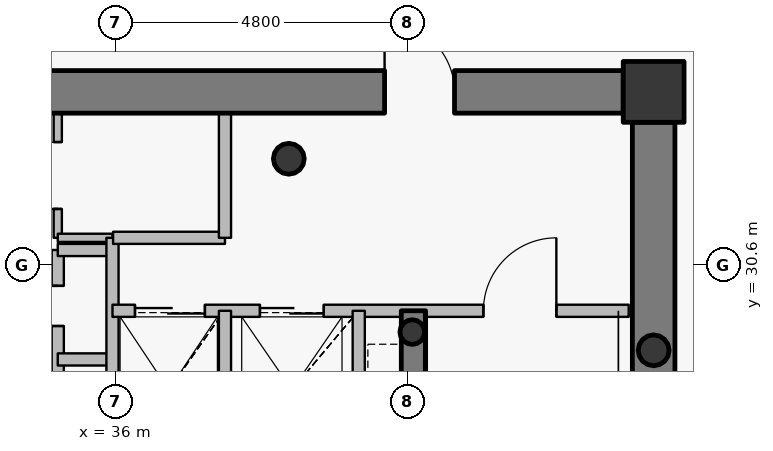
"""IFC4 building model, lengths in metres.
Left out: names, types, materials, properties, quantities, classifications, styles, units other than length and angle.
Written with IfcOpenShell. Run it as: python <this file> out.ifc"""

import sys

from ifc_helpers import new_model, si_unit, direction, frame, frame_2d, origin, origin_2d, place, context, subcontext, project, spatial, rectangle, hollow_circle, extrude, source, transform, mapped, element, fill, save


model = new_model("IFC4")
c1 = context("Model", 3, precision=1e-05, world=origin(), true_north=direction((0.0, 1.0)))
c2 = subcontext(c1, "Body", "Model", "MODEL_VIEW")
j1 = project(units=[si_unit("LENGTHUNIT", "METRE"), si_unit("PLANEANGLEUNIT", "RADIAN")], contexts=[c1])
p1 = place(None, origin())
s1 = spatial("IfcSite", under=j1, at=p1, CompositionType="ELEMENT")
p2 = place(p1, origin())
s2 = spatial("IfcBuilding", under=s1, at=p2, CompositionType="ELEMENT")
p3 = place(p2, frame((0.0, 0.0, 288.0)))
s3 = spatial("IfcBuildingStorey", under=s2, at=p3, CompositionType="ELEMENT", Elevation=288.0)
p4 = place(p3, frame((44.85, 33.45, 0.0), z_axis=(0.0, 0.0, 1.0), x_axis=(1.0, 0.0, 0.0)))
e1 = element("IfcColumn", 1, at=p4, inside=s3, PredefinedType="COLUMN", context=c2, shape_type="SweptSolid", body=[
    extrude(rectangle(XDim=1.0, YDim=1.0, at=origin_2d()), origin(), (0.0, 0.0, 1.0), 3.75),
])
p5 = place(p3, frame((38.85, 32.35, 0.0), z_axis=(0.0, 0.0, 1.0), x_axis=(1.0, 0.0, 0.0)))
e2 = element("IfcColumn", 2, at=p5, inside=s3, PredefinedType="COLUMN", context=c2, shape_type="SweptSolid", body=[
    extrude(hollow_circle(Radius=0.254, WallThickness=0.02, at=origin_2d()), origin(), (0.0, 0.0, 1.0), 3.75),
])
p6 = place(p3, frame((40.88, 29.5, 0.0), z_axis=(0.0, 0.0, 1.0), x_axis=(1.0, 0.0, 0.0)))
e3 = element("IfcColumn", 3, at=p6, inside=s3, PredefinedType="COLUMN", context=c2, shape_type="SweptSolid", body=[
    extrude(hollow_circle(Radius=0.203, WallThickness=0.016, at=origin_2d()), origin(), (0.0, 0.0, 1.0), 3.75),
])
p7 = place(p3, frame((27.65, 33.45, 0.0), z_axis=(0.0, 0.0, 1.0), x_axis=(1.0, 0.0, 0.0)))
e4 = element("IfcWall", 4, at=p7, inside=s3, PredefinedType="SHEAR", context=c2, shape_type="SweptSolid", body=[
    extrude(rectangle(XDim=16.7, YDim=0.7, at=frame_2d((8.35, 0.0))), origin(), (0.0, 0.0, 1.0), 3.05),
])
p8 = place(p7, frame((12.775, 0.0, 0.0)))
e5 = element("IfcOpeningElement", 5, at=p8, cuts=e4, PredefinedType="OPENING", context=c2, shape_type="SweptSolid", body=[
    extrude(rectangle(XDim=1.15, YDim=2.15, at=origin_2d()), frame((0.575, 0.36, 1.075), z_axis=(0.0, -1.0, 0.0), x_axis=(1.0, 0.0, 0.0)), (0.0, 0.0, 1.0), 0.72),
])
p9 = place(p3, frame((44.85, 32.95, 0.0), z_axis=(0.0, 0.0, 1.0), x_axis=(0.0, -1.0, 0.0)))
e6 = element("IfcWall", 6, at=p9, inside=s3, PredefinedType="SHEAR", context=c2, shape_type="SweptSolid", body=[
    extrude(rectangle(XDim=11.9, YDim=0.7, at=frame_2d((5.95, 0.0))), origin(), (0.0, 0.0, 1.0), 3.05),
])
p10 = place(p3, frame((40.9, 27.25, 0.0), z_axis=(0.0, 0.0, 1.0), x_axis=(0.0, 1.0, 0.0)))
e7 = element("IfcWall", 7, at=p10, inside=s3, PredefinedType="SHEAR", context=c2, shape_type="SweptSolid", body=[
    extrude(rectangle(XDim=2.6, YDim=0.4, at=frame_2d((1.3, 0.0))), origin(), (0.0, 0.0, 1.0), 3.1),
])
p11 = place(p3, frame((44.85, 29.2, 0.0), z_axis=(0.0, 0.0, 1.0), x_axis=(1.0, 0.0, 0.0)))
e8 = element("IfcColumn", 8, at=p11, inside=s3, PredefinedType="COLUMN", context=c2, shape_type="SweptSolid", body=[
    extrude(hollow_circle(Radius=0.254, WallThickness=0.02, at=origin_2d()), origin(), (0.0, 0.0, 1.0), 3.75),
])
p12 = place(p3, frame((35.05, 27.25, 0.0), z_axis=(0.0, 0.0, 1.0), x_axis=(0.0, 1.0, 0.0)))
e9 = element("IfcWall", 9, at=p12, inside=s3, PredefinedType="PARTITIONING", context=c2, shape_type="SweptSolid", body=[
    extrude(rectangle(XDim=3.6, YDim=0.2, at=frame_2d((1.8, 0.0))), origin(), (0.0, 0.0, 1.0), 3.5),
])
p13 = place(p12, frame((0.59, 0.0, 0.0)))
e10 = element("IfcOpeningElement", 10, at=p13, cuts=e9, PredefinedType="OPENING", context=c2, shape_type="SweptSolid", body=[
    extrude(rectangle(XDim=0.66, YDim=2.05, at=origin_2d()), frame((0.33, 0.11, 1.025), z_axis=(0.0, -1.0, 0.0), x_axis=(1.0, 0.0, 0.0)), (0.0, 0.0, 1.0), 0.22),
])
p14 = place(p12, frame((2.35, 0.0, 0.0)))
e11 = element("IfcOpeningElement", 11, at=p14, cuts=e9, PredefinedType="OPENING", context=c2, shape_type="SweptSolid", body=[
    extrude(rectangle(XDim=0.66, YDim=2.05, at=origin_2d()), frame((0.33, 0.11, 1.025), z_axis=(0.0, -1.0, 0.0), x_axis=(1.0, 0.0, 0.0)), (0.0, 0.0, 1.0), 0.22),
])
for number, where, z_axis, x_axis in (
    (12, (35.05, 29.05, 0.0), (0.0, 0.0, 1.0), (1.0, 0.0, 0.0)),
    (13, (35.05, 30.85, 0.0), (0.0, 0.0, 1.0), (1.0, 0.0, 0.0)),
):
    element("IfcWall", number, at=place(p3, frame(where, z_axis=z_axis, x_axis=x_axis)), inside=s3, PredefinedType="PARTITIONING", context=c2, shape_type="SweptSolid", body=[
        extrude(rectangle(XDim=0.9, YDim=0.2, at=frame_2d((0.45, 0.0))), origin(), (0.0, 0.0, 1.0), 3.5),
    ])
p15 = place(p3, frame((35.05, 31.05, 0.0), z_axis=(0.0, 0.0, 1.0), x_axis=(0.0, 1.0, 0.0)))
e14 = element("IfcWall", 14, at=p15, inside=s3, PredefinedType="PARTITIONING", context=c2, shape_type="SweptSolid", body=[
    extrude(rectangle(XDim=2.05, YDim=0.135, at=frame_2d((1.025, 0.0))), origin(), (0.0, 0.0, 1.0), 3.085),
])
p16 = place(p15, frame((0.475, 0.0, 0.0)))
e15 = element("IfcOpeningElement", 15, at=p16, cuts=e14, PredefinedType="OPENING", context=c2, shape_type="SweptSolid", body=[
    extrude(rectangle(XDim=1.1, YDim=2.15, at=origin_2d()), frame((0.55, 0.078, 1.075), z_axis=(0.0, -1.0, 0.0), x_axis=(1.0, 0.0, 0.0)), (0.0, 0.0, 1.0), 0.155),
])
p17 = place(p3, frame((35.05, 31.05, 0.0), z_axis=(0.0, 0.0, 1.0), x_axis=(1.0, 0.0, 0.0)))
e16 = element("IfcWall", 16, at=p17, inside=s3, PredefinedType="PARTITIONING", context=c2, shape_type="SweptSolid", body=[
    extrude(rectangle(XDim=0.9, YDim=0.135, at=frame_2d((0.45, 0.0))), origin(), (0.0, 0.0, 1.0), 3.5),
])
p18 = place(p3, frame((35.95, 27.25, 0.0), z_axis=(0.0, 0.0, 1.0), x_axis=(0.0, 1.0, 0.0)))
e17 = element("IfcWall", 17, at=p18, inside=s3, PredefinedType="PARTITIONING", context=c2, shape_type="SweptSolid", body=[
    extrude(rectangle(XDim=3.8, YDim=0.2, at=frame_2d((1.9, 0.0))), origin(), (0.0, 0.0, 1.0), 3.5),
])
p19 = place(p3, frame((35.95, 29.85, 0.0), z_axis=(0.0, 0.0, 1.0), x_axis=(1.0, 0.0, 0.0)))
e18 = element("IfcWall", 18, at=p19, inside=s3, PredefinedType="PARTITIONING", context=c2, shape_type="SweptSolid", body=[
    extrude(rectangle(XDim=8.49, YDim=0.2, at=frame_2d((4.245, 0.0))), origin(), (0.0, 0.0, 1.0), 3.085),
])
p20 = place(p19, frame((6.1, 0.0, 0.0)))
e19 = element("IfcOpeningElement", 19, at=p20, cuts=e18, PredefinedType="OPENING", context=c2, shape_type="SweptSolid", body=[
    extrude(rectangle(XDim=1.2, YDim=2.15, at=origin_2d()), frame((0.6, 0.11, 1.075), z_axis=(0.0, -1.0, 0.0), x_axis=(1.0, 0.0, 0.0)), (0.0, 0.0, 1.0), 0.22),
])
p21 = place(p19, frame((0.37, 0.0, 0.0)))
e20 = element("IfcOpeningElement", 20, at=p21, cuts=e18, PredefinedType="OPENING", context=c2, shape_type="SweptSolid", body=[
    extrude(rectangle(XDim=1.15, YDim=2.15, at=origin_2d()), frame((0.575, 0.11, 1.075), z_axis=(0.0, -1.0, 0.0), x_axis=(1.0, 0.0, 0.0)), (0.0, 0.0, 1.0), 0.22),
])
p22 = place(p19, frame((2.425, 0.0, 0.0)))
e21 = element("IfcOpeningElement", 21, at=p22, cuts=e18, PredefinedType="OPENING", context=c2, shape_type="SweptSolid", body=[
    extrude(rectangle(XDim=1.05, YDim=2.15, at=origin_2d()), frame((0.525, 0.11, 1.075), z_axis=(0.0, -1.0, 0.0), x_axis=(1.0, 0.0, 0.0)), (0.0, 0.0, 1.0), 0.22),
])
p23 = place(p3, frame((35.96, 31.05, 0.0), z_axis=(0.0, 0.0, 1.0), x_axis=(1.0, 0.0, 0.0)))
e22 = element("IfcWall", 22, at=p23, inside=s3, PredefinedType="PARTITIONING", context=c2, shape_type="SweptSolid", body=[
    extrude(rectangle(XDim=1.84, YDim=0.2, at=frame_2d((0.92, 0.0))), origin(), (0.0, 0.0, 1.0), 3.5),
])
p24 = place(p3, frame((37.8, 27.25, 0.0), z_axis=(0.0, 0.0, 1.0), x_axis=(0.0, 1.0, 0.0)))
e23 = element("IfcWall", 23, at=p24, inside=s3, PredefinedType="PARTITIONING", context=c2, shape_type="SweptSolid", body=[
    extrude(rectangle(XDim=2.6, YDim=0.2, at=frame_2d((1.3, 0.0))), origin(), (0.0, 0.0, 1.0), 3.5),
])
p25 = place(p3, frame((37.8, 31.05, 0.0), z_axis=(0.0, 0.0, 1.0), x_axis=(0.0, 1.0, 0.0)))
e24 = element("IfcWall", 24, at=p25, inside=s3, PredefinedType="PARTITIONING", context=c2, shape_type="SweptSolid", body=[
    extrude(rectangle(XDim=2.05, YDim=0.2, at=frame_2d((1.025, 0.0))), origin(), (0.0, 0.0, 1.0), 3.085),
])
p26 = place(p3, frame((40.0, 25.45, 0.0), z_axis=(0.0, 0.0, 1.0), x_axis=(0.0, 1.0, 0.0)))
e25 = element("IfcWall", 25, at=p26, inside=s3, PredefinedType="PARTITIONING", context=c2, shape_type="SweptSolid", body=[
    extrude(rectangle(XDim=4.4, YDim=0.2, at=frame_2d((2.2, 0.0))), origin(), (0.0, 0.0, 1.0), 3.5),
])
p27 = place(p3, frame((45.2, 33.8, 0.0), z_axis=(0.0, 0.0, 1.0), x_axis=(-1.0, 0.0, 0.0)))
e26 = element("IfcWall", 26, at=p27, inside=s3, PredefinedType="PARTITIONING", context=c2, shape_type="SweptSolid", body=[
    extrude(rectangle(XDim=0.84, YDim=0.135, at=frame_2d((0.42, 0.0))), origin(), (0.0, 0.0, 1.0), 3.035),
])
p28 = place(p3, frame((45.2, 32.96, 0.0), z_axis=(0.0, 0.0, 1.0), x_axis=(0.0, 1.0, 0.0)))
e27 = element("IfcWall", 27, at=p28, inside=s3, PredefinedType="PARTITIONING", context=c2, shape_type="SweptSolid", body=[
    extrude(rectangle(XDim=0.532, YDim=0.135, at=frame_2d((0.266, 0.0))), origin(), (0.0, 0.0, 1.0), 3.5),
])
m1 = source(origin(), c2, "Body", "SweptSolid", [
    extrude(rectangle(XDim=1.15, YDim=2.15, at=origin_2d()), frame((0.575, 0.025, 1.075), z_axis=(0.0, -1.0, 0.0), x_axis=(1.0, 0.0, 0.0)), (0.0, 0.0, 1.0), 0.05),
])
p29 = place(p8, origin())
e28 = element("IfcDoor", 28, at=p29, inside=s3, OperationType="SINGLE_SWING_LEFT", PredefinedType="DOOR", context=c2, shape_type="MappedRepresentation", body=[
    mapped(m1, transform((0.0, 0.0, 0.0), x_axis=(1.0, 0.0, 0.0), y_axis=(0.0, 1.0, 0.0), z_axis=(0.0, 0.0, 1.0), scale=1.0)),
])
fill(e5, e28)
m2 = source(origin(), c2, "Body", "SweptSolid", [
    extrude(rectangle(XDim=1.2, YDim=2.15, at=origin_2d()), frame((0.6, 0.025, 1.075), z_axis=(0.0, -1.0, 0.0), x_axis=(1.0, 0.0, 0.0)), (0.0, 0.0, 1.0), 0.05),
])
p30 = place(p20, origin())
e29 = element("IfcDoor", 29, at=p30, inside=s3, OperationType="SINGLE_SWING_RIGHT", PredefinedType="DOOR", context=c2, shape_type="MappedRepresentation", body=[
    mapped(m2, transform((0.0, 0.0, 0.0), x_axis=(1.0, 0.0, 0.0), y_axis=(0.0, 1.0, 0.0), z_axis=(0.0, 0.0, 1.0), scale=1.0)),
])
fill(e19, e29)
m3 = source(origin(), c2, "Body", "SweptSolid", [
    extrude(rectangle(XDim=1.15, YDim=2.15, at=origin_2d()), frame((0.575, 0.025, 1.075), z_axis=(0.0, -1.0, 0.0), x_axis=(1.0, 0.0, 0.0)), (0.0, 0.0, 1.0), 0.05),
])
p31 = place(p21, origin())
e30 = element("IfcDoor", 30, at=p31, inside=s3, OperationType="DOUBLE_DOOR_SLIDING", PredefinedType="USERDEFINED", context=c2, shape_type="MappedRepresentation", body=[
    mapped(m3, transform((0.0, 0.0, 0.0), x_axis=(1.0, 0.0, 0.0), y_axis=(0.0, 1.0, 0.0), z_axis=(0.0, 0.0, 1.0), scale=1.0)),
])
fill(e20, e30)
m4 = source(origin(), c2, "Body", "SweptSolid", [
    extrude(rectangle(XDim=1.05, YDim=2.15, at=origin_2d()), frame((0.525, 0.025, 1.075), z_axis=(0.0, -1.0, 0.0), x_axis=(1.0, 0.0, 0.0)), (0.0, 0.0, 1.0), 0.05),
])
p32 = place(p22, origin())
e31 = element("IfcDoor", 31, at=p32, inside=s3, OperationType="DOUBLE_DOOR_SLIDING", PredefinedType="USERDEFINED", context=c2, shape_type="MappedRepresentation", body=[
    mapped(m4, transform((0.0, 0.0, 0.0), x_axis=(1.0, 0.0, 0.0), y_axis=(0.0, 1.0, 0.0), z_axis=(0.0, 0.0, 1.0), scale=1.0)),
])
fill(e21, e31)
m5 = source(origin(), c2, "Body", "SweptSolid", [
    extrude(rectangle(XDim=0.66, YDim=2.05, at=origin_2d()), frame((0.33, 0.025, 1.025), z_axis=(0.0, -1.0, 0.0), x_axis=(1.0, 0.0, 0.0)), (0.0, 0.0, 1.0), 0.05),
])
p33 = place(p14, origin())
e32 = element("IfcDoor", 32, at=p33, inside=s3, OperationType="SINGLE_SWING_RIGHT", PredefinedType="USERDEFINED", context=c2, shape_type="MappedRepresentation", body=[
    mapped(m5, transform((0.0, 0.0, 0.0), x_axis=(1.0, 0.0, 0.0), y_axis=(0.0, 1.0, 0.0), z_axis=(0.0, 0.0, 1.0), scale=1.0)),
])
fill(e11, e32)
m6 = source(origin(), c2, "Body", "SweptSolid", [
    extrude(rectangle(XDim=1.1, YDim=2.15, at=origin_2d()), frame((0.55, 0.025, 1.075), z_axis=(0.0, -1.0, 0.0), x_axis=(1.0, 0.0, 0.0)), (0.0, 0.0, 1.0), 0.05),
])
p34 = place(p16, origin())
e33 = element("IfcDoor", 33, at=p34, inside=s3, OperationType="SINGLE_SWING_LEFT", PredefinedType="DOOR", context=c2, shape_type="MappedRepresentation", body=[
    mapped(m6, transform((0.0, 0.0, 0.0), x_axis=(1.0, 0.0, 0.0), y_axis=(0.0, 1.0, 0.0), z_axis=(0.0, 0.0, 1.0), scale=1.0)),
])
fill(e15, e33)
save(model, sys.argv[1])
